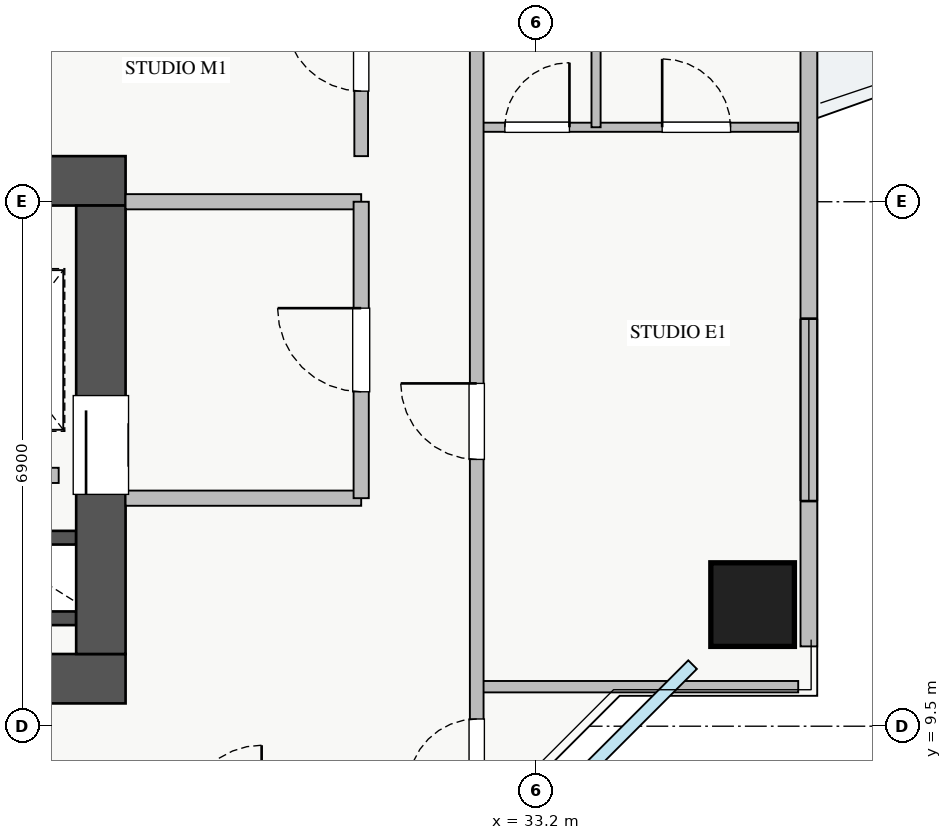
"""IFC4 building model, lengths in metres.
Left out: names, types, materials, properties, quantities, classifications, styles, units other than length and angle.
Written with IfcOpenShell. Run it as: python <this file> out.ifc"""

import sys

from ifc_helpers import new_model, si_unit, direction, frame, frame_2d, origin, origin_2d, place, context, subcontext, project, spatial, rectangle, extrude, source, transform, mapped, element, fill, save


model = new_model("IFC4")
c1 = context("Model", 3, precision=1e-05, world=origin(), true_north=direction((0.0, 1.0)))
c2 = subcontext(c1, "Body", "Model", "MODEL_VIEW")
j1 = project(units=[si_unit("LENGTHUNIT", "METRE"), si_unit("PLANEANGLEUNIT", "RADIAN")], contexts=[c1])
p1 = place(None, origin())
s1 = spatial("IfcSite", under=j1, at=p1, CompositionType="ELEMENT")
p2 = place(p1, origin())
s2 = spatial("IfcBuilding", under=s1, at=p2, CompositionType="ELEMENT")
p3 = place(p2, frame((0.0, 0.0, 119.75)))
s3 = spatial("IfcBuildingStorey", under=s2, at=p3, CompositionType="ELEMENT", Elevation=119.75)
for number, where, z_axis, x_axis in (
    (1, (25.8, 11.98, 0.0), (0.0, 0.0, 1.0), (1.0, 0.0, 0.0)),
    (2, (25.8, 10.92, 0.0), (0.0, 0.0, 1.0), (1.0, 0.0, 0.0)),
):
    element("IfcWall", number, at=place(p3, frame(where, z_axis=z_axis, x_axis=x_axis)), inside=s3, PredefinedType="SHEAR", context=c2, shape_type="SweptSolid", body=[
        extrude(rectangle(XDim=1.35, YDim=0.18, at=frame_2d((0.675, 0.0))), origin(), (0.0, 0.0, 1.0), 3.07),
    ])
p4 = place(p3, frame((10.2, 10.125, 0.0), z_axis=(0.0, 0.0, 1.0), x_axis=(1.0, 0.0, 0.0)))
e3 = element("IfcWall", 3, at=p4, inside=s3, PredefinedType="SHEAR", context=c2, shape_type="SweptSolid", body=[
    extrude(rectangle(XDim=17.6, YDim=0.65, at=frame_2d((8.8, 0.0))), origin(), (0.0, 0.0, 1.0), 3.25),
])
p5 = place(p4, frame((1.15, 0.0, 0.0)))
e4 = element("IfcOpeningElement", 4, at=p5, cuts=e3, PredefinedType="OPENING", context=c2, shape_type="SweptSolid", body=[
    extrude(rectangle(XDim=1.1, YDim=2.05, at=frame_2d((0.55, 1.025))), frame((0.0, 0.335, 0.0), z_axis=(0.0, -1.0, 0.0), x_axis=(1.0, 0.0, 0.0)), (0.0, 0.0, 1.0), 0.67),
])
p6 = place(p4, frame((8.3, 0.0, 0.0)))
e5 = element("IfcOpeningElement", 5, at=p6, cuts=e3, PredefinedType="OPENING", context=c2, shape_type="SweptSolid", body=[
    extrude(rectangle(XDim=1.1, YDim=2.05, at=frame_2d((0.55, 1.025))), frame((0.0, 0.335, 0.0), z_axis=(0.0, -1.0, 0.0), x_axis=(1.0, 0.0, 0.0)), (0.0, 0.0, 1.0), 0.67),
])
p7 = place(p4, frame((4.9, 0.0, 0.0)))
e6 = element("IfcOpeningElement", 6, at=p7, cuts=e3, PredefinedType="OPENING", context=c2, shape_type="SweptSolid", body=[
    extrude(rectangle(XDim=1.1, YDim=2.05, at=frame_2d((0.55, 1.025))), frame((0.0, 0.335, 0.0), z_axis=(0.0, -1.0, 0.0), x_axis=(1.0, 0.0, 0.0)), (0.0, 0.0, 1.0), 0.67),
])
p8 = place(p4, frame((14.74, 0.0, 0.0)))
e7 = element("IfcOpeningElement", 7, at=p8, cuts=e3, PredefinedType="OPENING", context=c2, shape_type="SweptSolid", body=[
    extrude(rectangle(XDim=1.0, YDim=2.05, at=frame_2d((0.5, 1.025))), frame((0.0, 0.335, 0.0), z_axis=(0.0, -1.0, 0.0), x_axis=(1.0, 0.0, 0.0)), (0.0, 0.0, 1.0), 0.67),
])
p9 = place(p4, frame((10.64, 0.0, 0.0)))
e8 = element("IfcOpeningElement", 8, at=p9, cuts=e3, PredefinedType="OPENING", context=c2, shape_type="SweptSolid", body=[
    extrude(rectangle(XDim=1.0, YDim=2.05, at=frame_2d((0.5, 1.025))), frame((0.0, 0.335, 0.0), z_axis=(0.0, -1.0, 0.0), x_axis=(1.0, 0.0, 0.0)), (0.0, 0.0, 1.0), 0.67),
])
p10 = place(p4, frame((13.09, 0.0, 0.0)))
e9 = element("IfcOpeningElement", 9, at=p10, cuts=e3, PredefinedType="OPENING", context=c2, shape_type="SweptSolid", body=[
    extrude(rectangle(XDim=1.0, YDim=2.05, at=frame_2d((0.5, 1.025))), frame((0.0, 0.335, 0.0), z_axis=(0.0, -1.0, 0.0), x_axis=(1.0, 0.0, 0.0)), (0.0, 0.0, 1.0), 0.67),
])
p11 = place(p3, frame((10.2, 16.675, 0.0), z_axis=(0.0, 0.0, 1.0), x_axis=(1.0, 0.0, 0.0)))
e10 = element("IfcWall", 10, at=p11, inside=s3, PredefinedType="SHEAR", context=c2, shape_type="SweptSolid", body=[
    extrude(rectangle(XDim=17.6, YDim=0.65, at=frame_2d((8.8, 0.0))), origin(), (0.0, 0.0, 1.0), 3.25),
])
p12 = place(p3, frame((27.475, 10.45, 0.0), z_axis=(0.0, 0.0, 1.0), x_axis=(0.0, 1.0, 0.0)))
e11 = element("IfcWall", 11, at=p12, inside=s3, PredefinedType="SHEAR", context=c2, shape_type="SweptSolid", body=[
    extrude(rectangle(XDim=5.9, YDim=0.65, at=frame_2d((2.95, 0.0))), origin(), (0.0, 0.0, 1.0), 3.25),
])
p13 = place(p12, frame((2.1, 0.0, 0.0)))
e12 = element("IfcOpeningElement", 12, at=p13, cuts=e11, PredefinedType="OPENING", context=c2, shape_type="SweptSolid", body=[
    extrude(rectangle(XDim=1.3, YDim=2.05, at=frame_2d((0.65, 1.025))), frame((0.0, 0.335, 0.0), z_axis=(0.0, -1.0, 0.0), x_axis=(1.0, 0.0, 0.0)), (0.0, 0.0, 1.0), 0.67),
])
m1 = source(origin(), c2, "Body", "SweptSolid", [
    extrude(rectangle(XDim=1.1, YDim=1.1, at=origin_2d()), origin(), (0.0, 0.0, 1.0), 3.25),
])
p14 = place(p3, frame((36.05, 11.1, 0.0), z_axis=(0.0, 0.0, 1.0), x_axis=(1.0, 0.0, 0.0)))
e13 = element("IfcColumn", 13, at=p14, inside=s3, PredefinedType="COLUMN", context=c2, shape_type="MappedRepresentation", body=[
    mapped(m1, transform((0.0, 0.0, 0.0), x_axis=(1.0, 0.0, 0.0), y_axis=(0.0, 1.0, 0.0), z_axis=(0.0, 0.0, 1.0), scale=1.0)),
])
p15 = place(p3, frame((36.79, 10.55, 0.0), z_axis=(0.0, 0.0, 1.0), x_axis=(0.0, 1.0, 0.0)))
e14 = element("IfcWall", 14, at=p15, inside=s3, PredefinedType="STANDARD", context=c2, shape_type="SweptSolid", body=[
    extrude(rectangle(XDim=24.9, YDim=0.22, at=frame_2d((12.45, 0.0))), origin(), (0.0, 0.0, 1.0), 2.61),
])
p16 = place(p15, frame((13.3, 0.0, 0.0)))
e15 = element("IfcOpeningElement", 15, at=p16, cuts=e14, PredefinedType="OPENING", context=c2, shape_type="SweptSolid", body=[
    extrude(rectangle(XDim=1.2, YDim=2.1, at=frame_2d((0.6, 1.05))), frame((0.0, 0.12, 0.0), z_axis=(0.0, -1.0, 0.0), x_axis=(1.0, 0.0, 0.0)), (0.0, 0.0, 1.0), 0.24),
])
p17 = place(p15, frame((1.912, 0.0, 0.9)))
e16 = element("IfcOpeningElement", 16, at=p17, cuts=e14, PredefinedType="OPENING", context=c2, shape_type="SweptSolid", body=[
    extrude(rectangle(XDim=2.4, YDim=1.48, at=frame_2d((1.2, 0.74))), frame((0.0, 0.12, 0.0), z_axis=(0.0, -1.0, 0.0), x_axis=(1.0, 0.0, 0.0)), (0.0, 0.0, 1.0), 0.24),
])
p18 = place(p15, frame((20.737, 0.0, 0.9)))
e17 = element("IfcOpeningElement", 17, at=p18, cuts=e14, PredefinedType="OPENING", context=c2, shape_type="SweptSolid", body=[
    extrude(rectangle(XDim=2.1, YDim=1.48, at=frame_2d((1.05, 0.74))), frame((0.0, 0.12, 0.0), z_axis=(0.0, -1.0, 0.0), x_axis=(1.0, 0.0, 0.0)), (0.0, 0.0, 1.0), 0.24),
])
p19 = place(p15, frame((14.72, 0.0, 0.9)))
e18 = element("IfcOpeningElement", 18, at=p19, cuts=e14, PredefinedType="OPENING", context=c2, shape_type="SweptSolid", body=[
    extrude(rectangle(XDim=0.9, YDim=1.2, at=frame_2d((0.45, 0.6))), frame((0.0, 0.12, 0.0), z_axis=(0.0, -1.0, 0.0), x_axis=(1.0, 0.0, 0.0)), (0.0, 0.0, 1.0), 0.24),
])
for number, where, z_axis, x_axis in (
    (19, (27.8, 16.4, 0.0), (0.0, 0.0, 1.0), (1.0, 0.0, 0.0)),
    (20, (27.8, 12.5, 0.0), (0.0, 0.0, 1.0), (1.0, 0.0, 0.0)),
):
    element("IfcWall", number, at=place(p3, frame(where, z_axis=z_axis, x_axis=x_axis)), inside=s3, PredefinedType="PARTITIONING", context=c2, shape_type="SweptSolid", body=[
        extrude(rectangle(XDim=3.1, YDim=0.2, at=frame_2d((1.55, 0.0))), origin(), (0.0, 0.0, 1.0), 3.07),
    ])
p20 = place(p3, frame((30.9, 12.5, 0.0), z_axis=(0.0, 0.0, 1.0), x_axis=(0.0, 1.0, 0.0)))
e21 = element("IfcWall", 21, at=p20, inside=s3, PredefinedType="PARTITIONING", context=c2, shape_type="SweptSolid", body=[
    extrude(rectangle(XDim=3.9, YDim=0.2, at=frame_2d((1.95, 0.0))), origin(), (0.0, 0.0, 1.0), 3.07),
])
p21 = place(p20, frame((1.4, 0.0, 0.0)))
e22 = element("IfcOpeningElement", 22, at=p21, cuts=e21, PredefinedType="OPENING", context=c2, shape_type="SweptSolid", body=[
    extrude(rectangle(XDim=1.1, YDim=2.05, at=frame_2d((0.55, 1.025))), frame((0.0, 0.11, 0.0), z_axis=(0.0, -1.0, 0.0), x_axis=(1.0, 0.0, 0.0)), (0.0, 0.0, 1.0), 0.22),
])
p22 = place(p3, frame((21.75, 12.8, 0.0), z_axis=(0.0, 0.0, 1.0), x_axis=(1.0, 0.0, 0.0)))
e23 = element("IfcWall", 23, at=p22, inside=s3, PredefinedType="PARTITIONING", context=c2, shape_type="SweptSolid", body=[
    extrude(rectangle(XDim=5.17, YDim=0.2, at=frame_2d((2.585, 0.0))), origin(), (0.0, 0.0, 1.0), 3.07),
])
p23 = place(p3, frame((32.42, 10.02, 0.0), z_axis=(0.0, 0.0, 1.0), x_axis=(1.0, 0.0, 0.0)))
e24 = element("IfcWall", 24, at=p23, inside=s3, PredefinedType="PARTITIONING", context=c2, shape_type="SweptSolid", body=[
    extrude(rectangle(XDim=4.23, YDim=0.15, at=frame_2d((2.115, 0.0))), origin(), (0.0, 0.0, 1.0), 3.07),
])
p24 = place(p3, frame((32.42, 17.38, 0.0), z_axis=(0.0, 0.0, 1.0), x_axis=(1.0, 0.0, 0.0)))
e25 = element("IfcWall", 25, at=p24, inside=s3, PredefinedType="PLUMBINGWALL", context=c2, shape_type="SweptSolid", body=[
    extrude(rectangle(XDim=4.23, YDim=0.12, at=frame_2d((2.115, 0.0))), origin(), (0.0, 0.0, 1.0), 3.07),
])
p25 = place(p24, frame((0.37, 0.0, 0.0)))
e26 = element("IfcOpeningElement", 26, at=p25, cuts=e25, PredefinedType="OPENING", context=c2, shape_type="SweptSolid", body=[
    extrude(rectangle(XDim=0.85, YDim=2.05, at=frame_2d((0.425, 1.025))), frame((0.0, 0.07, 0.0), z_axis=(0.0, -1.0, 0.0), x_axis=(1.0, 0.0, 0.0)), (0.0, 0.0, 1.0), 0.14),
])
p26 = place(p24, frame((2.44, 0.0, 0.0)))
e27 = element("IfcOpeningElement", 27, at=p26, cuts=e25, PredefinedType="OPENING", context=c2, shape_type="SweptSolid", body=[
    extrude(rectangle(XDim=0.9, YDim=2.05, at=frame_2d((0.45, 1.025))), frame((0.0, 0.07, 0.0), z_axis=(0.0, -1.0, 0.0), x_axis=(1.0, 0.0, 0.0)), (0.0, 0.0, 1.0), 0.14),
])
p27 = place(p3, frame((33.99, 17.38, 0.0), z_axis=(0.0, 0.0, 1.0), x_axis=(0.0, 1.0, 0.0)))
e28 = element("IfcWall", 28, at=p27, inside=s3, PredefinedType="PLUMBINGWALL", context=c2, shape_type="SweptSolid", body=[
    extrude(rectangle(XDim=6.27, YDim=0.12, at=frame_2d((3.135, 0.0))), origin(), (0.0, 0.0, 1.0), 3.07),
])
p28 = place(p3, frame((32.42, 8.25, 0.0), z_axis=(0.0, 0.0, 1.0), x_axis=(0.0, 1.0, 0.0)))
e29 = element("IfcWall", 29, at=p28, inside=s3, PredefinedType="PARTITIONING", context=c2, shape_type="SweptSolid", body=[
    extrude(rectangle(XDim=29.5, YDim=0.18, at=frame_2d((14.75, 0.0))), origin(), (0.0, 0.0, 1.0), 3.07),
])
p29 = place(p28, frame((28.155, 0.0, 0.0)))
e30 = element("IfcOpeningElement", 30, at=p29, cuts=e29, PredefinedType="OPENING", context=c2, shape_type="SweptSolid", body=[
    extrude(rectangle(XDim=0.9, YDim=2.05, at=frame_2d((0.45, 1.025))), frame((0.0, 0.1, 0.0), z_axis=(0.0, -1.0, 0.0), x_axis=(1.0, 0.0, 0.0)), (0.0, 0.0, 1.0), 0.2),
])
p30 = place(p28, frame((0.445, 0.0, 0.0)))
e31 = element("IfcOpeningElement", 31, at=p30, cuts=e29, PredefinedType="OPENING", context=c2, shape_type="SweptSolid", body=[
    extrude(rectangle(XDim=0.9, YDim=2.05, at=frame_2d((0.45, 1.025))), frame((0.0, 0.1, 0.0), z_axis=(0.0, -1.0, 0.0), x_axis=(1.0, 0.0, 0.0)), (0.0, 0.0, 1.0), 0.2),
])
p31 = place(p28, frame((4.76, 0.0, 0.0)))
e32 = element("IfcOpeningElement", 32, at=p31, cuts=e29, PredefinedType="OPENING", context=c2, shape_type="SweptSolid", body=[
    extrude(rectangle(XDim=1.0, YDim=2.05, at=frame_2d((0.5, 1.025))), frame((0.0, 0.1, 0.0), z_axis=(0.0, -1.0, 0.0), x_axis=(1.0, 0.0, 0.0)), (0.0, 0.0, 1.0), 0.2),
])
p32 = place(p28, frame((18.04, 0.0, 0.0)))
e33 = element("IfcOpeningElement", 33, at=p32, cuts=e29, PredefinedType="OPENING", context=c2, shape_type="SweptSolid", body=[
    extrude(rectangle(XDim=1.0, YDim=2.05, at=frame_2d((0.5, 1.025))), frame((0.0, 0.1, 0.0), z_axis=(0.0, -1.0, 0.0), x_axis=(1.0, 0.0, 0.0)), (0.0, 0.0, 1.0), 0.2),
])
p33 = place(p3, frame((30.9, 17.0, 0.0), z_axis=(0.0, 0.0, 1.0), x_axis=(0.0, 1.0, 0.0)))
e34 = element("IfcWall", 34, at=p33, inside=s3, PredefinedType="PARTITIONING", context=c2, shape_type="SweptSolid", body=[
    extrude(rectangle(XDim=12.0, YDim=0.18, at=frame_2d((6.0, 0.0))), origin(), (0.0, 0.0, 1.0), 3.07),
])
p34 = place(p33, frame((0.855, 0.0, 0.0)))
e35 = element("IfcOpeningElement", 35, at=p34, cuts=e34, PredefinedType="OPENING", context=c2, shape_type="SweptSolid", body=[
    extrude(rectangle(XDim=1.0, YDim=2.05, at=frame_2d((0.5, 1.025))), frame((0.0, 0.1, 0.0), z_axis=(0.0, -1.0, 0.0), x_axis=(1.0, 0.0, 0.0)), (0.0, 0.0, 1.0), 0.2),
])
p35 = place(p33, frame((6.725, 0.0, 0.0)))
e36 = element("IfcOpeningElement", 36, at=p35, cuts=e34, PredefinedType="OPENING", context=c2, shape_type="SweptSolid", body=[
    extrude(rectangle(XDim=1.0, YDim=2.05, at=frame_2d((0.5, 1.025))), frame((0.0, 0.1, 0.0), z_axis=(0.0, -1.0, 0.0), x_axis=(1.0, 0.0, 0.0)), (0.0, 0.0, 1.0), 0.2),
])
m2 = source(origin(), c2, "Body", "SweptSolid", [
    extrude(rectangle(XDim=2.4, YDim=1.48, at=frame_2d((1.2, 0.74))), frame((0.0, 0.03, 0.0), z_axis=(0.0, -1.0, 0.0), x_axis=(1.0, 0.0, 0.0)), (0.0, 0.0, 1.0), 0.06),
])
p36 = place(p17, origin())
e37 = element("IfcWindow", 37, at=p36, inside=s3, PartitioningType="TRIPLE_PANEL_VERTICAL", PredefinedType="WINDOW", context=c2, shape_type="MappedRepresentation", body=[
    mapped(m2, transform((0.0, 0.0, 0.0), x_axis=(1.0, 0.0, 0.0), y_axis=(0.0, 1.0, 0.0), z_axis=(0.0, 0.0, 1.0), scale=1.0)),
])
fill(e16, e37)
m3 = source(origin(), c2, "Body", "SweptSolid", [
    extrude(rectangle(XDim=1.3, YDim=2.05, at=frame_2d((0.65, 1.025))), frame((0.0, 0.025, 0.0), z_axis=(0.0, -1.0, 0.0), x_axis=(1.0, 0.0, 0.0)), (0.0, 0.0, 1.0), 0.05),
])
p37 = place(p13, origin())
e38 = element("IfcDoor", 38, at=p37, inside=s3, OperationType="SLIDING_TO_RIGHT", PredefinedType="DOOR", context=c2, shape_type="MappedRepresentation", body=[
    mapped(m3, transform((0.0, 0.0, 0.0), x_axis=(1.0, 0.0, 0.0), y_axis=(0.0, 1.0, 0.0), z_axis=(0.0, 0.0, 1.0), scale=1.0)),
])
fill(e12, e38)
m4 = source(origin(), c2, "Body", "SweptSolid", [
    extrude(rectangle(XDim=1.1, YDim=2.05, at=frame_2d((0.55, 1.025))), frame((0.0, 0.025, 0.0), z_axis=(0.0, -1.0, 0.0), x_axis=(1.0, 0.0, 0.0)), (0.0, 0.0, 1.0), 0.05),
])
p38 = place(p21, origin())
e39 = element("IfcDoor", 39, at=p38, inside=s3, OperationType="SINGLE_SWING_RIGHT", PredefinedType="DOOR", context=c2, shape_type="MappedRepresentation", body=[
    mapped(m4, transform((0.0, 0.0, 0.0), x_axis=(1.0, 0.0, 0.0), y_axis=(0.0, 1.0, 0.0), z_axis=(0.0, 0.0, 1.0), scale=1.0)),
])
fill(e22, e39)
m5 = source(origin(), c2, "Body", "SweptSolid", [
    extrude(rectangle(XDim=0.85, YDim=2.05, at=frame_2d((0.425, 1.025))), frame((0.0, 0.025, 0.0), z_axis=(0.0, -1.0, 0.0), x_axis=(1.0, 0.0, 0.0)), (0.0, 0.0, 1.0), 0.05),
])
p39 = place(p25, origin())
e40 = element("IfcDoor", 40, at=p39, inside=s3, OperationType="SINGLE_SWING_RIGHT", PredefinedType="DOOR", context=c2, shape_type="MappedRepresentation", body=[
    mapped(m5, transform((0.0, 0.0, 0.0), x_axis=(1.0, 0.0, 0.0), y_axis=(0.0, 1.0, 0.0), z_axis=(0.0, 0.0, 1.0), scale=1.0)),
])
fill(e26, e40)
m6 = source(origin(), c2, "Body", "SweptSolid", [
    extrude(rectangle(XDim=0.9, YDim=2.05, at=frame_2d((0.45, 1.025))), frame((0.0, 0.025, 0.0), z_axis=(0.0, -1.0, 0.0), x_axis=(1.0, 0.0, 0.0)), (0.0, 0.0, 1.0), 0.05),
])
p40 = place(p26, origin())
e41 = element("IfcDoor", 41, at=p40, inside=s3, OperationType="SINGLE_SWING_LEFT", PredefinedType="DOOR", context=c2, shape_type="MappedRepresentation", body=[
    mapped(m6, transform((0.0, 0.0, 0.0), x_axis=(1.0, 0.0, 0.0), y_axis=(0.0, 1.0, 0.0), z_axis=(0.0, 0.0, 1.0), scale=1.0)),
])
fill(e27, e41)
p41 = place(p30, origin())
e42 = element("IfcDoor", 42, at=p41, inside=s3, OperationType="SINGLE_SWING_LEFT", PredefinedType="DOOR", context=c2, shape_type="MappedRepresentation", body=[
    mapped(m6, transform((0.0, 0.0, 0.0), x_axis=(1.0, 0.0, 0.0), y_axis=(0.0, 1.0, 0.0), z_axis=(0.0, 0.0, 1.0), scale=1.0)),
])
fill(e31, e42)
m7 = source(origin(), c2, "Body", "SweptSolid", [
    extrude(rectangle(XDim=1.0, YDim=2.05, at=frame_2d((0.5, 1.025))), frame((0.0, 0.025, 0.0), z_axis=(0.0, -1.0, 0.0), x_axis=(1.0, 0.0, 0.0)), (0.0, 0.0, 1.0), 0.05),
])
p42 = place(p31, origin())
e43 = element("IfcDoor", 43, at=p42, inside=s3, OperationType="SINGLE_SWING_RIGHT", PredefinedType="DOOR", context=c2, shape_type="MappedRepresentation", body=[
    mapped(m7, transform((0.0, 0.0, 0.0), x_axis=(1.0, 0.0, 0.0), y_axis=(0.0, 1.0, 0.0), z_axis=(0.0, 0.0, 1.0), scale=1.0)),
])
fill(e32, e43)
p43 = place(p34, origin())
e44 = element("IfcDoor", 44, at=p43, inside=s3, OperationType="SINGLE_SWING_RIGHT", PredefinedType="DOOR", context=c2, shape_type="MappedRepresentation", body=[
    mapped(m7, transform((0.0, 0.0, 0.0), x_axis=(1.0, 0.0, 0.0), y_axis=(0.0, 1.0, 0.0), z_axis=(0.0, 0.0, 1.0), scale=1.0)),
])
fill(e35, e44)
save(model, sys.argv[1])
